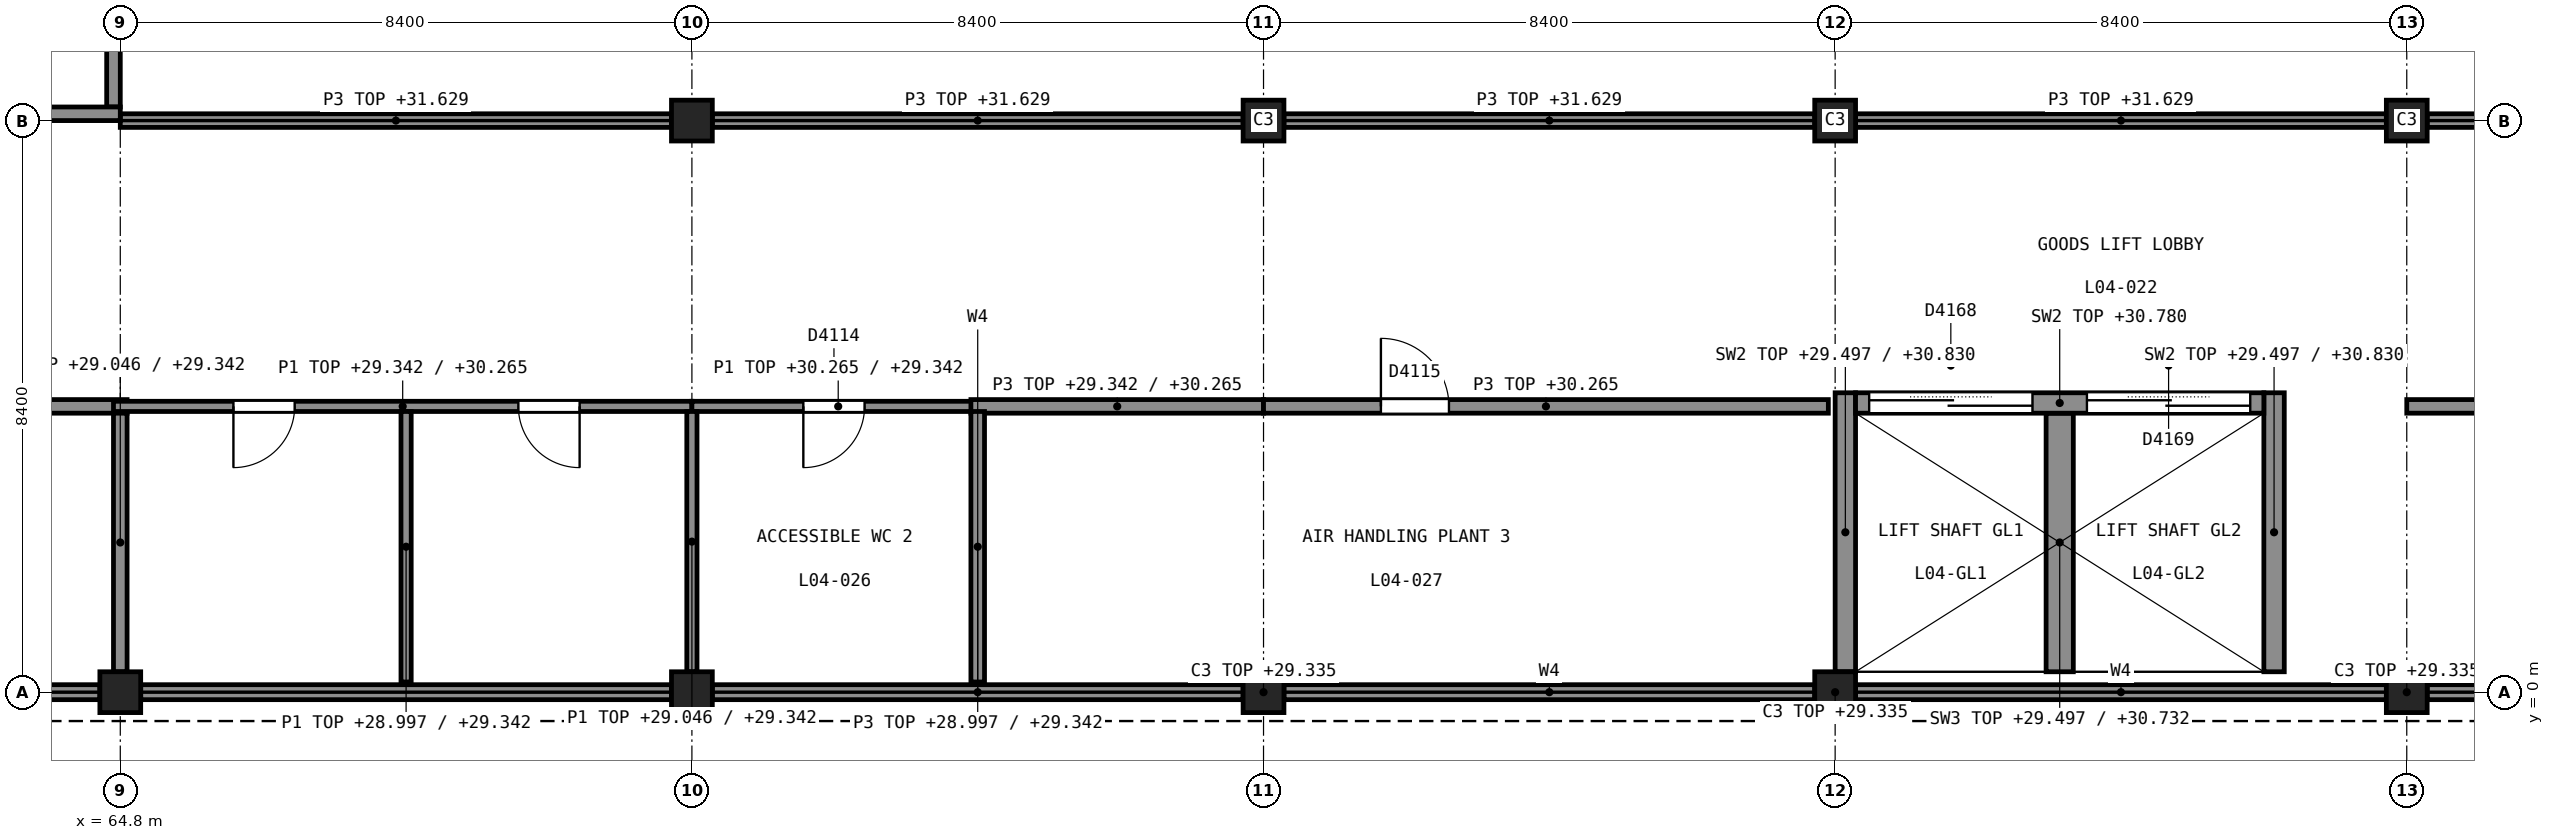
"""IFC4 building model, lengths in metres.
Left out: names, types, materials, properties, quantities, classifications, styles, units other than length and angle.
Written with IfcOpenShell. Run it as: python <this file> out.ifc"""

import sys

from ifc_helpers import new_model, si_unit, direction, frame, frame_2d, origin, origin_2d, place, context, subcontext, project, spatial, polyline, rectangle, outline, extrude, element, fill, save


model = new_model("IFC4")
c1 = context("Model", 3, precision=1e-05, world=origin(), true_north=direction((0.0, 1.0)))
c2 = subcontext(c1, "Body", "Model", "MODEL_VIEW")
j1 = project(units=[si_unit("LENGTHUNIT", "METRE"), si_unit("PLANEANGLEUNIT", "RADIAN")], contexts=[c1])
p1 = place(None, origin())
s1 = spatial("IfcSite", under=j1, at=p1, CompositionType="ELEMENT")
p2 = place(p1, origin())
s2 = spatial("IfcBuilding", under=s1, at=p2, CompositionType="ELEMENT")
p3 = place(p2, frame((0.0, 0.0, 25.0)))
s3 = spatial("IfcBuildingStorey", under=s2, at=p3, CompositionType="ELEMENT", Elevation=25.0)
p4 = place(p3, frame((56.4, 8.5, 0.0), z_axis=(0.0, 0.0, 1.0), x_axis=(1.0, 0.0, 0.0)))
e1 = element("IfcWall", 1, at=p4, inside=s3, PredefinedType="SHEAR", context=c2, shape_type="SweptSolid", body=[
    extrude(rectangle(XDim=8.4, YDim=0.2, at=frame_2d((4.2, 0.0))), origin(), (0.0, 0.0, 1.0), 7.097),
])
p5 = place(p4, frame((3.3, 0.0, 0.0)))
e2 = element("IfcOpeningElement", 2, at=p5, cuts=e1, PredefinedType="OPENING", context=c2, shape_type="SweptSolid", body=[
    extrude(rectangle(XDim=1.8, YDim=2.1, at=frame_2d((0.9, 1.05))), frame((0.0, 0.11, 0.0), z_axis=(0.0, -1.0, 0.0), x_axis=(1.0, 0.0, 0.0)), (0.0, 0.0, 1.0), 0.22),
])
p6 = place(p3, frame((64.7, 8.6, 0.0), z_axis=(0.0, 0.0, 1.0), x_axis=(0.0, 1.0, 0.0)))
e3 = element("IfcWall", 3, at=p6, inside=s3, PredefinedType="SHEAR", context=c2, shape_type="SweptSolid", body=[
    extrude(outline(polyline([(0.0, 0.0), (8.0, 0.0), (8.0, 4.465), (7.704, 4.561), (7.407, 4.658), (6.519, 4.946), (6.222, 5.043), (5.333, 5.331), (5.037, 5.428), (4.444, 5.62), (4.148, 5.717), (3.259, 6.005), (2.963, 6.102), (2.074, 6.39), (1.778, 6.487), (1.185, 6.679), (0.889, 6.776), (0.0, 7.064), (0.0, 0.0)])), frame((0.0, 0.1, 0.0), z_axis=(0.0, -1.0, 0.0), x_axis=(1.0, 0.0, 0.0)), (0.0, 0.0, 1.0), 0.2),
])
for number, where, z_axis, x_axis in (
    (4, (90.15, 0.3, 0.0), (0.0, 0.0, 1.0), (0.0, 1.0, 0.0)),
    (5, (96.45, 0.3, 0.0), (0.0, 0.0, 1.0), (0.0, 1.0, 0.0)),
):
    element("IfcWall", number, at=place(p3, frame(where, z_axis=z_axis, x_axis=x_axis)), inside=s3, PredefinedType="SHEAR", context=c2, shape_type="SweptSolid", body=[
        extrude(outline(polyline([(0.0, 0.0), (4.1, 0.0), (4.1, 5.83), (3.807, 5.734), (2.05, 5.164), (1.757, 5.068), (0.293, 4.593), (0.0, 4.497), (0.0, 0.0)])), frame((0.0, 0.15, 0.0), z_axis=(0.0, -1.0, 0.0), x_axis=(1.0, 0.0, 0.0)), (0.0, 0.0, 1.0), 0.3),
    ])
p7 = place(p3, frame((90.3, 4.25, 0.0), z_axis=(0.0, 0.0, 1.0), x_axis=(1.0, 0.0, 0.0)))
e6 = element("IfcWall", 6, at=p7, inside=s3, PredefinedType="SHEAR", context=c2, shape_type="SweptSolid", body=[
    extrude(rectangle(XDim=6.0, YDim=0.3, at=frame_2d((3.0, 0.0))), origin(), (0.0, 0.0, 1.0), 5.78),
])
p8 = place(p7, frame((0.2, 0.0, 0.0)))
e7 = element("IfcOpeningElement", 7, at=p8, cuts=e6, PredefinedType="OPENING", context=c2, shape_type="SweptSolid", body=[
    extrude(rectangle(XDim=2.4, YDim=2.4, at=frame_2d((1.2, 1.2))), frame((0.0, 0.16, 0.0), z_axis=(0.0, -1.0, 0.0), x_axis=(1.0, 0.0, 0.0)), (0.0, 0.0, 1.0), 0.32),
])
p9 = place(p7, frame((3.4, 0.0, 0.0)))
e8 = element("IfcOpeningElement", 8, at=p9, cuts=e6, PredefinedType="OPENING", context=c2, shape_type="SweptSolid", body=[
    extrude(rectangle(XDim=2.4, YDim=2.4, at=frame_2d((1.2, 1.2))), frame((0.0, 0.16, 0.0), z_axis=(0.0, -1.0, 0.0), x_axis=(1.0, 0.0, 0.0)), (0.0, 0.0, 1.0), 0.32),
])
p10 = place(p3, frame((93.3, 0.3, 0.0), z_axis=(0.0, 0.0, 1.0), x_axis=(0.0, 1.0, 0.0)))
e9 = element("IfcWall", 9, at=p10, inside=s3, PredefinedType="SHEAR", context=c2, shape_type="SweptSolid", body=[
    extrude(outline(polyline([(0.0, 0.0), (3.8, 0.0), (3.8, 5.732), (0.0, 4.497), (0.0, 0.0)])), frame((0.0, 0.2, 0.0), z_axis=(0.0, -1.0, 0.0), x_axis=(1.0, 0.0, 0.0)), (0.0, 0.0, 1.0), 0.4),
])
for number, where, z_axis, x_axis in (
    (10, (64.8, 0.0, 0.0), (0.0, 0.0, 1.0), (1.0, 0.0, 0.0)),
    (11, (73.2, 0.0, 0.0), (0.0, 0.0, 1.0), (1.0, 0.0, 0.0)),
):
    element("IfcColumn", number, at=place(p3, frame(where, z_axis=z_axis, x_axis=x_axis)), inside=s3, PredefinedType="COLUMN", context=c2, shape_type="SweptSolid", body=[
        extrude(rectangle(XDim=0.6, YDim=0.6, at=origin_2d()), origin(), (0.0, 0.0, 1.0), 4.335),
    ])
p11 = place(p3, frame((73.2, 8.4, 0.0), z_axis=(0.0, 0.0, 1.0), x_axis=(1.0, 0.0, 0.0)))
e12 = element("IfcColumn", 12, at=p11, inside=s3, PredefinedType="COLUMN", context=c2, shape_type="SweptSolid", body=[
    extrude(rectangle(XDim=0.6, YDim=0.6, at=origin_2d()), origin(), (0.0, 0.0, 1.0), 5.0),
])
p12 = place(p3, frame((81.6, 0.0, 0.0), z_axis=(0.0, 0.0, 1.0), x_axis=(1.0, 0.0, 0.0)))
e13 = element("IfcColumn", 13, at=p12, inside=s3, PredefinedType="COLUMN", context=c2, shape_type="SweptSolid", body=[
    extrude(rectangle(XDim=0.6, YDim=0.6, at=origin_2d()), origin(), (0.0, 0.0, 1.0), 4.335),
])
p13 = place(p3, frame((81.6, 8.4, 0.0), z_axis=(0.0, 0.0, 1.0), x_axis=(1.0, 0.0, 0.0)))
e14 = element("IfcColumn", 14, at=p13, inside=s3, PredefinedType="COLUMN", context=c2, shape_type="SweptSolid", body=[
    extrude(rectangle(XDim=0.6, YDim=0.6, at=origin_2d()), origin(), (0.0, 0.0, 1.0), 5.0),
])
p14 = place(p3, frame((90.0, 0.0, 0.0), z_axis=(0.0, 0.0, 1.0), x_axis=(1.0, 0.0, 0.0)))
e15 = element("IfcColumn", 15, at=p14, inside=s3, PredefinedType="COLUMN", context=c2, shape_type="SweptSolid", body=[
    extrude(rectangle(XDim=0.6, YDim=0.6, at=origin_2d()), origin(), (0.0, 0.0, 1.0), 4.335),
])
p15 = place(p3, frame((90.0, 8.4, 0.0), z_axis=(0.0, 0.0, 1.0), x_axis=(1.0, 0.0, 0.0)))
e16 = element("IfcColumn", 16, at=p15, inside=s3, PredefinedType="COLUMN", context=c2, shape_type="SweptSolid", body=[
    extrude(rectangle(XDim=0.6, YDim=0.6, at=origin_2d()), origin(), (0.0, 0.0, 1.0), 5.0),
])
p16 = place(p3, frame((98.4, 0.0, 0.0), z_axis=(0.0, 0.0, 1.0), x_axis=(1.0, 0.0, 0.0)))
e17 = element("IfcColumn", 17, at=p16, inside=s3, PredefinedType="COLUMN", context=c2, shape_type="SweptSolid", body=[
    extrude(rectangle(XDim=0.6, YDim=0.6, at=origin_2d()), origin(), (0.0, 0.0, 1.0), 4.335),
])
p17 = place(p3, frame((98.4, 8.4, 0.0), z_axis=(0.0, 0.0, 1.0), x_axis=(1.0, 0.0, 0.0)))
e18 = element("IfcColumn", 18, at=p17, inside=s3, PredefinedType="COLUMN", context=c2, shape_type="SweptSolid", body=[
    extrude(rectangle(XDim=0.6, YDim=0.6, at=origin_2d()), origin(), (0.0, 0.0, 1.0), 5.0),
])
p18 = place(p3, frame((56.7, 0.0, 0.0), z_axis=(0.0, 0.0, 1.0), x_axis=(1.0, 0.0, 0.0)))
e19 = element("IfcWall", 19, at=p18, inside=s3, PredefinedType="SOLIDWALL", context=c2, shape_type="SweptSolid", body=[
    extrude(rectangle(XDim=7.8, YDim=0.22, at=frame_2d((3.9, 0.0))), origin(), (0.0, 0.0, 1.0), 4.334),
])
p19 = place(p3, frame((65.1, 0.0, 0.0), z_axis=(0.0, 0.0, 1.0), x_axis=(1.0, 0.0, 0.0)))
e20 = element("IfcWall", 20, at=p19, inside=s3, PredefinedType="SOLIDWALL", context=c2, shape_type="SweptSolid", body=[
    extrude(rectangle(XDim=7.8, YDim=0.22, at=frame_2d((3.9, 0.0))), origin(), (0.0, 0.0, 1.0), 4.334),
])
for number, where, z_axis, x_axis in (
    (21, (73.5, 0.0, 0.0), (0.0, 0.0, 1.0), (1.0, 0.0, 0.0)),
    (22, (81.9, 0.0, 0.0), (0.0, 0.0, 1.0), (1.0, 0.0, 0.0)),
    (23, (90.3, 0.0, 0.0), (0.0, 0.0, 1.0), (1.0, 0.0, 0.0)),
    (24, (98.7, 0.0, 0.0), (0.0, 0.0, 1.0), (1.0, 0.0, 0.0)),
):
    element("IfcWall", number, at=place(p3, frame(where, z_axis=z_axis, x_axis=x_axis)), inside=s3, PredefinedType="SOLIDWALL", context=c2, shape_type="SweptSolid", body=[
        extrude(rectangle(XDim=7.8, YDim=0.22, at=frame_2d((3.9, 0.0))), origin(), (0.0, 0.0, 1.0), 4.334),
    ])
p20 = place(p3, frame((64.8, 8.4, 0.0), z_axis=(0.0, 0.0, 1.0), x_axis=(1.0, 0.0, 0.0)))
e25 = element("IfcWall", 25, at=p20, inside=s3, PredefinedType="PARTITIONING", context=c2, shape_type="SweptSolid", body=[
    extrude(outline(polyline([(0.0, 0.0), (8.1, 0.0), (8.1, 6.629), (5.25, 6.629), (4.2, 3.091), (3.15, 6.629), (0.0, 6.629), (0.0, 0.0)])), frame((0.0, 0.1, 0.0), z_axis=(0.0, -1.0, 0.0), x_axis=(1.0, 0.0, 0.0)), (0.0, 0.0, 1.0), 0.2),
])
for number, where, z_axis, x_axis in (
    (26, (73.5, 8.4, 0.0), (0.0, 0.0, 1.0), (1.0, 0.0, 0.0)),
    (27, (81.9, 8.4, 0.0), (0.0, 0.0, 1.0), (1.0, 0.0, 0.0)),
    (28, (90.3, 8.4, 0.0), (0.0, 0.0, 1.0), (1.0, 0.0, 0.0)),
    (29, (98.7, 8.4, 0.0), (0.0, 0.0, 1.0), (1.0, 0.0, 0.0)),
):
    element("IfcWall", number, at=place(p3, frame(where, z_axis=z_axis, x_axis=x_axis)), inside=s3, PredefinedType="PARTITIONING", context=c2, shape_type="SweptSolid", body=[
        extrude(outline(polyline([(0.0, 0.0), (7.8, 0.0), (7.8, 6.629), (6.3, 6.629), (5.25, 3.091), (4.2, 6.629), (2.1, 6.629), (1.05, 3.091), (0.0, 6.629), (0.0, 0.0)])), frame((0.0, 0.1, 0.0), z_axis=(0.0, -1.0, 0.0), x_axis=(1.0, 0.0, 0.0)), (0.0, 0.0, 1.0), 0.2),
    ])
p21 = place(p3, frame((98.4, 4.2, 0.0), z_axis=(0.0, 0.0, 1.0), x_axis=(1.0, 0.0, 0.0)))
e30 = element("IfcWall", 30, at=p21, inside=s3, PredefinedType="PARTITIONING", context=c2, shape_type="SweptSolid", body=[
    extrude(outline(polyline([(0.0, 0.0), (8.4, 0.0), (8.4, 5.265), (5.25, 5.265), (4.2, 4.342), (3.15, 5.265), (0.0, 5.265), (0.0, 0.0)])), frame((0.0, 0.1, 0.0), z_axis=(0.0, -1.0, 0.0), x_axis=(1.0, 0.0, 0.0)), (0.0, 0.0, 1.0), 0.2),
])
p22 = place(p21, frame((5.275, 0.0, 0.0)))
e31 = element("IfcOpeningElement", 31, at=p22, cuts=e30, PredefinedType="OPENING", context=c2, shape_type="SweptSolid", body=[
    extrude(rectangle(XDim=1.8, YDim=2.1, at=frame_2d((0.9, 1.05))), frame((0.0, 0.11, 0.0), z_axis=(0.0, -1.0, 0.0), x_axis=(1.0, 0.0, 0.0)), (0.0, 0.0, 1.0), 0.22),
])
p23 = place(p3, frame((56.4, 4.2, 0.0), z_axis=(0.0, 0.0, 1.0), x_axis=(1.0, 0.0, 0.0)))
e32 = element("IfcWall", 32, at=p23, inside=s3, PredefinedType="PARTITIONING", context=c2, shape_type="SweptSolid", body=[
    extrude(outline(polyline([(0.0, 0.0), (8.5, 0.0), (8.5, 4.342), (8.4, 4.342), (7.35, 5.265), (5.25, 5.265), (4.2, 4.342), (3.15, 5.265), (1.05, 5.265), (0.0, 4.342), (0.0, 0.0)])), frame((0.0, 0.1, 0.0), z_axis=(0.0, -1.0, 0.0), x_axis=(1.0, 0.0, 0.0)), (0.0, 0.0, 1.0), 0.2),
])
p24 = place(p3, frame((64.7, 4.2, 0.0), z_axis=(0.0, 0.0, 1.0), x_axis=(1.0, 0.0, 0.0)))
e33 = element("IfcWall", 33, at=p24, inside=s3, PredefinedType="PARTITIONING", context=c2, shape_type="SweptSolid", body=[
    extrude(outline(polyline([(0.0, 0.0), (8.5, 0.0), (8.5, 5.265), (5.25, 5.265), (4.2, 4.342), (3.15, 5.265), (1.05, 5.265), (0.0, 4.342), (0.0, 0.0)])), frame((0.0, 0.075, 0.0), z_axis=(0.0, -1.0, 0.0), x_axis=(1.0, 0.0, 0.0)), (0.0, 0.0, 1.0), 0.15),
])
p25 = place(p24, frame((1.762, 0.0, 0.0)))
e34 = element("IfcOpeningElement", 34, at=p25, cuts=e33, PredefinedType="OPENING", context=c2, shape_type="SweptSolid", body=[
    extrude(rectangle(XDim=0.9, YDim=2.1, at=frame_2d((0.45, 1.05))), frame((0.0, 0.085, 0.0), z_axis=(0.0, -1.0, 0.0), x_axis=(1.0, 0.0, 0.0)), (0.0, 0.0, 1.0), 0.17),
])
p26 = place(p24, frame((5.95, 0.0, 0.0)))
e35 = element("IfcOpeningElement", 35, at=p26, cuts=e33, PredefinedType="OPENING", context=c2, shape_type="SweptSolid", body=[
    extrude(rectangle(XDim=0.9, YDim=2.1, at=frame_2d((0.45, 1.05))), frame((0.0, 0.085, 0.0), z_axis=(0.0, -1.0, 0.0), x_axis=(1.0, 0.0, 0.0)), (0.0, 0.0, 1.0), 0.17),
])
p27 = place(p3, frame((73.2, 4.2, 0.0), z_axis=(0.0, 0.0, 1.0), x_axis=(1.0, 0.0, 0.0)))
e36 = element("IfcWall", 36, at=p27, inside=s3, PredefinedType="PARTITIONING", context=c2, shape_type="SweptSolid", body=[
    extrude(outline(polyline([(0.0, 0.0), (4.3, 0.0), (4.3, 4.342), (4.2, 4.342), (3.15, 5.265), (0.0, 5.265), (0.0, 0.0)])), frame((0.0, 0.075, 0.0), z_axis=(0.0, -1.0, 0.0), x_axis=(1.0, 0.0, 0.0)), (0.0, 0.0, 1.0), 0.15),
])
p28 = place(p27, frame((1.637, 0.0, 0.0)))
e37 = element("IfcOpeningElement", 37, at=p28, cuts=e36, PredefinedType="OPENING", context=c2, shape_type="SweptSolid", body=[
    extrude(rectangle(XDim=0.9, YDim=2.1, at=frame_2d((0.45, 1.05))), frame((0.0, 0.085, 0.0), z_axis=(0.0, -1.0, 0.0), x_axis=(1.0, 0.0, 0.0)), (0.0, 0.0, 1.0), 0.17),
])
p29 = place(p3, frame((77.3, 4.2, 0.0), z_axis=(0.0, 0.0, 1.0), x_axis=(1.0, 0.0, 0.0)))
e38 = element("IfcWall", 38, at=p29, inside=s3, PredefinedType="PARTITIONING", context=c2, shape_type="SweptSolid", body=[
    extrude(outline(polyline([(0.0, 0.0), (4.3, 0.0), (4.3, 5.265), (1.05, 5.265), (0.0, 4.342), (0.0, 0.0)])), frame((0.0, 0.1, 0.0), z_axis=(0.0, -1.0, 0.0), x_axis=(1.0, 0.0, 0.0)), (0.0, 0.0, 1.0), 0.2),
])
p30 = place(p3, frame((81.6, 4.2, 0.0), z_axis=(0.0, 0.0, 1.0), x_axis=(1.0, 0.0, 0.0)))
e39 = element("IfcWall", 39, at=p30, inside=s3, PredefinedType="PARTITIONING", context=c2, shape_type="SweptSolid", body=[
    extrude(outline(polyline([(0.0, 0.0), (8.3, 0.0), (8.3, 5.265), (5.25, 5.265), (4.2, 4.342), (3.15, 5.265), (0.0, 5.265), (0.0, 0.0)])), frame((0.0, 0.1, 0.0), z_axis=(0.0, -1.0, 0.0), x_axis=(1.0, 0.0, 0.0)), (0.0, 0.0, 1.0), 0.2),
])
p31 = place(p30, frame((1.725, 0.0, 0.0)))
e40 = element("IfcOpeningElement", 40, at=p31, cuts=e39, PredefinedType="OPENING", context=c2, shape_type="SweptSolid", body=[
    extrude(rectangle(XDim=1.0, YDim=2.1, at=frame_2d((0.5, 1.05))), frame((0.0, 0.11, 0.0), z_axis=(0.0, -1.0, 0.0), x_axis=(1.0, 0.0, 0.0)), (0.0, 0.0, 1.0), 0.22),
])
p32 = place(p3, frame((64.8, 0.3, 0.0), z_axis=(0.0, 0.0, 1.0), x_axis=(0.0, 1.0, 0.0)))
e41 = element("IfcWall", 41, at=p32, inside=s3, PredefinedType="PARTITIONING", context=c2, shape_type="SweptSolid", body=[
    extrude(outline(polyline([(0.0, 0.0), (3.8, 0.0), (3.8, 4.342), (2.1, 4.342), (1.05, 4.339), (0.0, 4.046), (0.0, 0.0)])), frame((0.0, 0.1, 0.0), z_axis=(0.0, -1.0, 0.0), x_axis=(1.0, 0.0, 0.0)), (0.0, 0.0, 1.0), 0.2),
])
p33 = place(p3, frame((69.0, 0.15, 0.0), z_axis=(0.0, 0.0, 1.0), x_axis=(0.0, 1.0, 0.0)))
e42 = element("IfcWall", 42, at=p33, inside=s3, PredefinedType="PARTITIONING", context=c2, shape_type="SweptSolid", body=[
    extrude(outline(polyline([(0.0, 0.0), (3.975, 0.0), (3.975, 4.342), (2.1, 4.342), (1.05, 4.29), (0.0, 3.997), (0.0, 0.0)])), frame((0.0, 0.075, 0.0), z_axis=(0.0, -1.0, 0.0), x_axis=(1.0, 0.0, 0.0)), (0.0, 0.0, 1.0), 0.15),
])
p34 = place(p3, frame((73.2, 0.3, 0.0), z_axis=(0.0, 0.0, 1.0), x_axis=(0.0, 1.0, 0.0)))
e43 = element("IfcWall", 43, at=p34, inside=s3, PredefinedType="PARTITIONING", context=c2, shape_type="SweptSolid", body=[
    extrude(outline(polyline([(0.0, 0.0), (3.825, 0.0), (3.825, 4.342), (2.1, 4.342), (1.05, 4.339), (0.0, 4.046), (0.0, 0.0)])), frame((0.0, 0.075, 0.0), z_axis=(0.0, -1.0, 0.0), x_axis=(1.0, 0.0, 0.0)), (0.0, 0.0, 1.0), 0.15),
])
p35 = place(p3, frame((77.4, 0.15, 0.0), z_axis=(0.0, 0.0, 1.0), x_axis=(0.0, 1.0, 0.0)))
e44 = element("IfcWall", 44, at=p35, inside=s3, PredefinedType="PARTITIONING", context=c2, shape_type="SweptSolid", body=[
    extrude(outline(polyline([(0.0, 0.0), (3.975, 0.0), (3.975, 4.342), (2.1, 4.342), (1.05, 4.29), (0.0, 3.997), (0.0, 0.0)])), frame((0.0, 0.1, 0.0), z_axis=(0.0, -1.0, 0.0), x_axis=(1.0, 0.0, 0.0)), (0.0, 0.0, 1.0), 0.2),
])
p36 = place(p25, origin())
e45 = element("IfcDoor", 45, at=p36, inside=s3, OperationType="SINGLE_SWING_LEFT", PredefinedType="DOOR", context=c2, shape_type="SweptSolid", body=[
    extrude(rectangle(XDim=0.9, YDim=2.1, at=frame_2d((0.45, 1.05))), frame((0.0, 0.025, 0.0), z_axis=(0.0, -1.0, 0.0), x_axis=(1.0, 0.0, 0.0)), (0.0, 0.0, 1.0), 0.05),
])
fill(e34, e45)
p37 = place(p26, origin())
e46 = element("IfcDoor", 46, at=p37, inside=s3, OperationType="SINGLE_SWING_RIGHT", PredefinedType="DOOR", context=c2, shape_type="SweptSolid", body=[
    extrude(rectangle(XDim=0.9, YDim=2.1, at=frame_2d((0.45, 1.05))), frame((0.0, 0.025, 0.0), z_axis=(0.0, -1.0, 0.0), x_axis=(1.0, 0.0, 0.0)), (0.0, 0.0, 1.0), 0.05),
])
fill(e35, e46)
p38 = place(p28, origin())
e47 = element("IfcDoor", 47, at=p38, inside=s3, OperationType="SINGLE_SWING_LEFT", PredefinedType="DOOR", context=c2, shape_type="SweptSolid", body=[
    extrude(rectangle(XDim=0.9, YDim=2.1, at=frame_2d((0.45, 1.05))), frame((0.0, 0.025, 0.0), z_axis=(0.0, -1.0, 0.0), x_axis=(1.0, 0.0, 0.0)), (0.0, 0.0, 1.0), 0.05),
])
fill(e37, e47)
p39 = place(p31, origin())
e48 = element("IfcDoor", 48, at=p39, inside=s3, OperationType="SINGLE_SWING_RIGHT", PredefinedType="DOOR", context=c2, shape_type="SweptSolid", body=[
    extrude(rectangle(XDim=1.0, YDim=2.1, at=frame_2d((0.5, 1.05))), frame((0.0, 0.025, 0.0), z_axis=(0.0, -1.0, 0.0), x_axis=(1.0, 0.0, 0.0)), (0.0, 0.0, 1.0), 0.05),
])
fill(e40, e48)
p40 = place(p8, origin())
e49 = element("IfcDoor", 49, at=p40, inside=s3, OperationType="DOUBLE_DOOR_SLIDING", PredefinedType="DOOR", context=c2, shape_type="SweptSolid", body=[
    extrude(rectangle(XDim=2.4, YDim=2.4, at=frame_2d((1.2, 1.2))), frame((0.0, 0.025, 0.0), z_axis=(0.0, -1.0, 0.0), x_axis=(1.0, 0.0, 0.0)), (0.0, 0.0, 1.0), 0.05),
])
fill(e7, e49)
p41 = place(p9, origin())
e50 = element("IfcDoor", 50, at=p41, inside=s3, OperationType="DOUBLE_DOOR_SLIDING", PredefinedType="DOOR", context=c2, shape_type="SweptSolid", body=[
    extrude(rectangle(XDim=2.4, YDim=2.4, at=frame_2d((1.2, 1.2))), frame((0.0, 0.025, 0.0), z_axis=(0.0, -1.0, 0.0), x_axis=(1.0, 0.0, 0.0)), (0.0, 0.0, 1.0), 0.05),
])
fill(e8, e50)
save(model, sys.argv[1])
